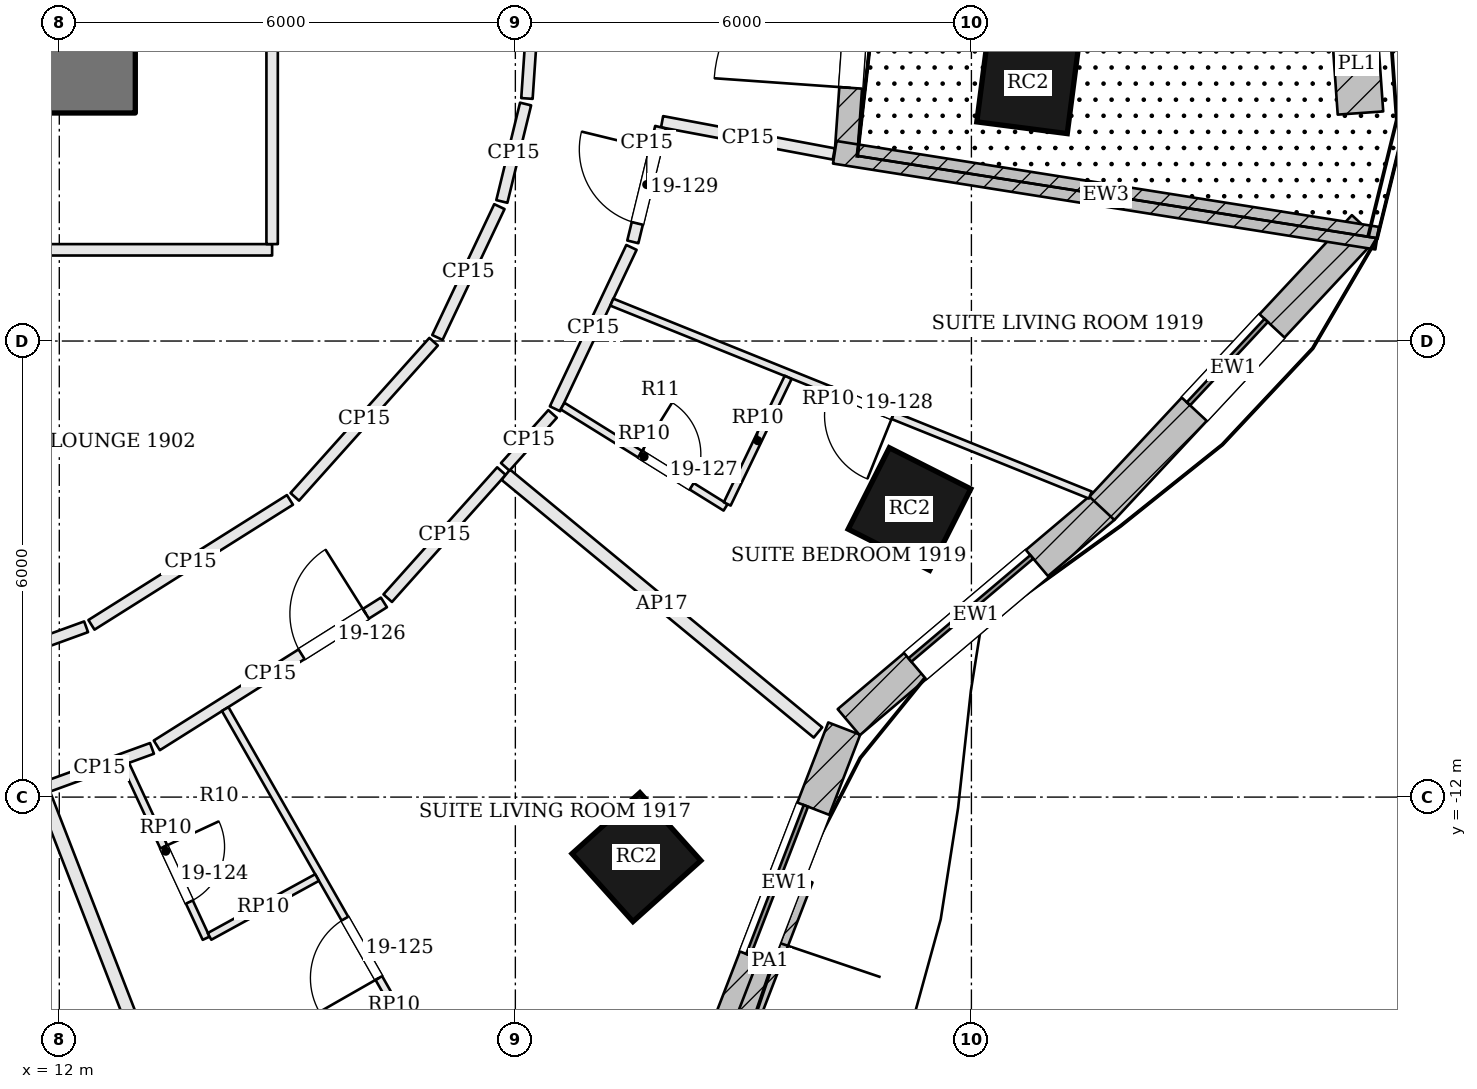
"""IFC4 building model, lengths in metres.
Left out: names, types, materials, properties, quantities, classifications, styles, units other than length and angle.
Written with IfcOpenShell. Run it as: python <this file> out.ifc"""

import sys

from ifc_helpers import new_model, si_unit, direction, frame, frame_2d, origin, origin_2d, place, context, subcontext, project, spatial, rectangle, extrude, element, fill, save


model = new_model("IFC4")
c1 = context("Model", 3, precision=1e-05, world=origin(), true_north=direction((0.0, 1.0)))
c2 = subcontext(c1, "Body", "Model", "MODEL_VIEW")
j1 = project(units=[si_unit("LENGTHUNIT", "METRE"), si_unit("PLANEANGLEUNIT", "RADIAN")], contexts=[c1])
p1 = place(None, origin())
s1 = spatial("IfcSite", under=j1, at=p1, CompositionType="ELEMENT")
p2 = place(p1, origin())
s2 = spatial("IfcBuilding", under=s1, at=p2, CompositionType="ELEMENT")
p3 = place(p2, frame((0.0, 0.0, 85.2)))
s3 = spatial("IfcBuildingStorey", under=s2, at=p3, CompositionType="ELEMENT", Elevation=85.2)
p4 = place(p3, frame((-13.0, -2.45, 0.0), z_axis=(0.0, 0.0, 1.0), x_axis=(1.0, 0.0, 0.0)))
e1 = element("IfcWall", 1, at=p4, inside=s3, PredefinedType="SHEAR", context=c2, shape_type="SweptSolid", body=[
    extrude(rectangle(XDim=26.0, YDim=1.1, at=frame_2d((13.0, 0.0))), origin(), (0.0, 0.0, 1.0), 3.6),
])
p5 = place(p4, frame((9.65, 0.0, 0.0)))
e2 = element("IfcOpeningElement", 2, at=p5, cuts=e1, PredefinedType="OPENING", context=c2, shape_type="SweptSolid", body=[
    extrude(rectangle(XDim=1.0, YDim=2.1, at=frame_2d((0.5, 1.05))), frame((0.0, 0.56, 0.0), z_axis=(0.0, -1.0, 0.0), x_axis=(1.0, 0.0, 0.0)), (0.0, 0.0, 1.0), 1.12),
])
p6 = place(p4, frame((12.925, 0.0, 0.0)))
e3 = element("IfcOpeningElement", 3, at=p6, cuts=e1, PredefinedType="OPENING", context=c2, shape_type="SweptSolid", body=[
    extrude(rectangle(XDim=1.0, YDim=2.1, at=frame_2d((0.5, 1.05))), frame((0.0, 0.56, 0.0), z_axis=(0.0, -1.0, 0.0), x_axis=(1.0, 0.0, 0.0)), (0.0, 0.0, 1.0), 1.12),
])
p7 = place(p4, frame((15.125, 0.0, 0.0)))
e4 = element("IfcOpeningElement", 4, at=p7, cuts=e1, PredefinedType="OPENING", context=c2, shape_type="SweptSolid", body=[
    extrude(rectangle(XDim=0.7, YDim=2.1, at=frame_2d((0.35, 1.05))), frame((0.0, 0.56, 0.0), z_axis=(0.0, -1.0, 0.0), x_axis=(1.0, 0.0, 0.0)), (0.0, 0.0, 1.0), 1.12),
])
p8 = place(p4, frame((16.5, 0.0, 0.0)))
e5 = element("IfcOpeningElement", 5, at=p8, cuts=e1, PredefinedType="OPENING", context=c2, shape_type="SweptSolid", body=[
    extrude(rectangle(XDim=1.0, YDim=2.1, at=frame_2d((0.5, 1.05))), frame((0.0, 0.56, 0.0), z_axis=(0.0, -1.0, 0.0), x_axis=(1.0, 0.0, 0.0)), (0.0, 0.0, 1.0), 1.12),
])
for number, where, z_axis, x_axis in (
    (6, (19.593, -12.79, 0.0), (0.0, 0.0, 1.0), (0.744, 0.668, 0.0)),
    (7, (23.185, -8.21, 0.0), (0.0, 0.0, 1.0), (0.451, 0.893, 0.0)),
    (8, (24.743, -2.599, 0.0), (0.0, 0.0, 1.0), (0.128, 0.992, 0.0)),
):
    element("IfcColumn", number, at=place(p3, frame(where, z_axis=z_axis, x_axis=x_axis)), inside=s3, PredefinedType="COLUMN", context=c2, shape_type="SweptSolid", body=[
        extrude(rectangle(XDim=1.2, YDim=1.2, at=origin_2d()), origin(), (0.0, 0.0, 1.0), 3.6),
    ])
p9 = place(p3, frame((20.757, -15.166, 0.0), z_axis=(0.0, 0.0, 1.0), x_axis=(0.360067043581, 0.932926430179, 0.0)))
e9 = element("IfcWall", 9, at=p9, inside=s3, PredefinedType="SOLIDWALL", context=c2, shape_type="SweptSolid", body=[
    extrude(rectangle(XDim=4.36, YDim=0.45, at=frame_2d((2.18, 0.0))), origin(), (0.0, 0.0, 1.0), 3.4),
])
p10 = place(p9, frame((1.13, 0.0, 0.9)))
e10 = element("IfcOpeningElement", 10, at=p10, cuts=e9, PredefinedType="OPENING", context=c2, shape_type="SweptSolid", body=[
    extrude(rectangle(XDim=2.1, YDim=2.0, at=frame_2d((1.05, 1.0))), frame((0.0, 0.235, 0.0), z_axis=(0.0, -1.0, 0.0), x_axis=(1.0, 0.0, 0.0)), (0.0, 0.0, 1.0), 0.47),
])
p11 = place(p3, frame((22.386, -11.014, 0.0), z_axis=(0.0, 0.0, 1.0), x_axis=(0.763569952162, 0.645725118108, 0.0)))
e11 = element("IfcWall", 11, at=p11, inside=s3, PredefinedType="SOLIDWALL", context=c2, shape_type="SweptSolid", body=[
    extrude(rectangle(XDim=4.386, YDim=0.45, at=frame_2d((2.193, 0.0))), origin(), (0.0, 0.0, 1.0), 3.4),
])
p12 = place(p11, frame((1.143, 0.0, 0.9)))
e12 = element("IfcOpeningElement", 12, at=p12, cuts=e11, PredefinedType="OPENING", context=c2, shape_type="SweptSolid", body=[
    extrude(rectangle(XDim=2.1, YDim=2.0, at=frame_2d((1.05, 1.0))), frame((0.0, 0.235, 0.0), z_axis=(0.0, -1.0, 0.0), x_axis=(1.0, 0.0, 0.0)), (0.0, 0.0, 1.0), 0.47),
])
p13 = place(p3, frame((25.717, -8.201, 0.0), z_axis=(0.0, 0.0, 1.0), x_axis=(0.681990073025, 0.731361429319, 0.0)))
e13 = element("IfcWall", 13, at=p13, inside=s3, PredefinedType="SOLIDWALL", context=c2, shape_type="SweptSolid", body=[
    extrude(rectangle(XDim=5.064, YDim=0.45, at=frame_2d((2.532, 0.0))), origin(), (0.0, 0.0, 1.0), 3.4),
])
p14 = place(p13, frame((1.782, 0.0, 0.9)))
e14 = element("IfcOpeningElement", 14, at=p14, cuts=e13, PredefinedType="OPENING", context=c2, shape_type="SweptSolid", body=[
    extrude(rectangle(XDim=1.5, YDim=2.0, at=frame_2d((0.75, 1.0))), frame((0.0, 0.235, 0.0), z_axis=(0.0, -1.0, 0.0), x_axis=(1.0, 0.0, 0.0)), (0.0, 0.0, 1.0), 0.47),
])
p15 = place(p3, frame((22.349, -3.553, 0.0), z_axis=(0.0, 0.0, 1.0), x_axis=(0.070246642253, 0.99752965332, 0.0)))
e15 = element("IfcWall", 15, at=p15, inside=s3, PredefinedType="SOLIDWALL", context=c2, shape_type="SweptSolid", body=[
    extrude(rectangle(XDim=3.573, YDim=0.3, at=frame_2d((1.786, 0.0))), origin(), (0.0, 0.0, 1.0), 2.904),
])
p16 = place(p15, frame((0.886, 0.0, 0.0)))
e16 = element("IfcOpeningElement", 16, at=p16, cuts=e15, PredefinedType="OPENING", context=c2, shape_type="SweptSolid", body=[
    extrude(rectangle(XDim=1.8, YDim=2.4, at=frame_2d((0.9, 1.2))), frame((0.0, 0.16, 0.0), z_axis=(0.0, -1.0, 0.0), x_axis=(1.0, 0.0, 0.0)), (0.0, 0.0, 1.0), 0.32),
])
p17 = place(p3, frame((29.338, -4.647, 0.0), z_axis=(0.0, 0.0, 1.0), x_axis=(-0.9876932675, 0.156403354615, 0.0)))
e17 = element("IfcWall", 17, at=p17, inside=s3, PredefinedType="SOLIDWALL", context=c2, shape_type="SweptSolid", body=[
    extrude(rectangle(XDim=7.224, YDim=0.3, at=frame_2d((3.612, 0.0))), origin(), (0.0, 0.0, 1.0), 2.954),
])
p18 = place(p3, frame((29.118, -3.0, 0.0), z_axis=(0.0, 0.0, 1.0), x_axis=(-0.070251176174, 0.997529334028, 0.0)))
e18 = element("IfcWall", 18, at=p18, inside=s3, PredefinedType="SOLIDWALL", context=c2, shape_type="SweptSolid", body=[
    extrude(rectangle(XDim=1.307, YDim=0.6, at=frame_2d((0.653, 0.0))), origin(), (0.0, 0.0, 1.0), 0.6),
])
p19 = place(p3, frame((20.933, -15.237, 3.6), z_axis=(0.0, 0.0, 1.0), x_axis=(0.360021038217, 0.932944184848, 0.0)))
e19 = element("IfcWall", 19, at=p19, inside=s3, PredefinedType="PARAPET", context=c2, shape_type="SweptSolid", body=[
    extrude(rectangle(XDim=2.323, YDim=0.3, at=frame_2d((1.162, 0.0))), origin(), (0.0, 0.0, 1.0), 1.1),
])
p20 = place(p3, frame((22.189, -3.539, 0.0), z_axis=(0.0, 0.0, 1.0), x_axis=(-0.982828866566, 0.184519427283, 0.0)))
e20 = element("IfcWall", 20, at=p20, inside=s3, PredefinedType="PARTITIONING", context=c2, shape_type="SweptSolid", body=[
    extrude(rectangle(XDim=2.298, YDim=0.15, at=frame_2d((1.149, 0.0))), origin(), (0.0, 0.0, 1.0), 2.784),
])
p21 = place(p3, frame((14.976, -20.153, 0.0), z_axis=(0.0, 0.0, 1.0), x_axis=(-0.361741189075, 0.932278559298, 0.0)))
e21 = element("IfcWall", 21, at=p21, inside=s3, PredefinedType="PARTITIONING", context=c2, shape_type="SweptSolid", body=[
    extrude(rectangle(XDim=8.791, YDim=0.175, at=frame_2d((4.395, 0.0))), origin(), (0.0, 0.0, 1.0), 2.784),
])
p22 = place(p3, frame((11.839, -11.862, 0.0), z_axis=(0.0, 0.0, 1.0), x_axis=(0.939613732968, 0.342236808099, 0.0)))
e22 = element("IfcWall", 22, at=p22, inside=s3, PredefinedType="PARTITIONING", context=c2, shape_type="SweptSolid", body=[
    extrude(rectangle(XDim=1.469, YDim=0.15, at=frame_2d((0.734, 0.0))), origin(), (0.0, 0.0, 1.0), 2.784),
])
p23 = place(p3, frame((13.283, -11.319, 0.0), z_axis=(0.0, 0.0, 1.0), x_axis=(0.84630789582, 0.532694044901, 0.0)))
e23 = element("IfcWall", 23, at=p23, inside=s3, PredefinedType="PARTITIONING", context=c2, shape_type="SweptSolid", body=[
    extrude(rectangle(XDim=3.53, YDim=0.15, at=frame_2d((1.765, 0.0))), origin(), (0.0, 0.0, 1.0), 2.784),
])
p24 = place(p23, frame((2.25, 0.0, 0.0)))
e24 = element("IfcOpeningElement", 24, at=p24, cuts=e23, PredefinedType="OPENING", context=c2, shape_type="SweptSolid", body=[
    extrude(rectangle(XDim=1.0, YDim=2.1, at=frame_2d((0.5, 1.05))), frame((0.0, 0.085, 0.0), z_axis=(0.0, -1.0, 0.0), x_axis=(1.0, 0.0, 0.0)), (0.0, 0.0, 1.0), 0.17),
])
p25 = place(p3, frame((16.321, -9.383, 0.0), z_axis=(0.0, 0.0, 1.0), x_axis=(0.666839397401, 0.745201461401, 0.0)))
e25 = element("IfcWall", 25, at=p25, inside=s3, PredefinedType="PARTITIONING", context=c2, shape_type="SweptSolid", body=[
    extrude(rectangle(XDim=2.243, YDim=0.15, at=frame_2d((1.122, 0.0))), origin(), (0.0, 0.0, 1.0), 2.784),
])
p26 = place(p3, frame((21.981, -11.15, 0.0), z_axis=(0.0, 0.0, 1.0), x_axis=(-0.77113299289, 0.636674098167, 0.0)))
e26 = element("IfcWall", 26, at=p26, inside=s3, PredefinedType="PARTITIONING", context=c2, shape_type="SweptSolid", body=[
    extrude(rectangle(XDim=5.325, YDim=0.175, at=frame_2d((2.663, 0.0))), origin(), (0.0, 0.0, 1.0), 2.784),
])
p27 = place(p3, frame((17.867, -7.655, 0.0), z_axis=(0.0, 0.0, 1.0), x_axis=(0.666810140689, 0.745227640574, 0.0)))
e27 = element("IfcWall", 27, at=p27, inside=s3, PredefinedType="PARTITIONING", context=c2, shape_type="SweptSolid", body=[
    extrude(rectangle(XDim=0.934, YDim=0.15, at=frame_2d((0.467, 0.0))), origin(), (0.0, 0.0, 1.0), 2.784),
])
p28 = place(p3, frame((18.522, -6.891, 0.0), z_axis=(0.0, 0.0, 1.0), x_axis=(0.428157819028, 0.903703979191, 0.0)))
e28 = element("IfcWall", 28, at=p28, inside=s3, PredefinedType="PARTITIONING", context=c2, shape_type="SweptSolid", body=[
    extrude(rectangle(XDim=2.349, YDim=0.15, at=frame_2d((1.175, 0.0))), origin(), (0.0, 0.0, 1.0), 2.784),
])
p29 = place(p3, frame((19.545, -4.696, 0.0), z_axis=(0.0, 0.0, 1.0), x_axis=(0.236608489862, 0.971605075391, 0.0)))
e29 = element("IfcWall", 29, at=p29, inside=s3, PredefinedType="PARTITIONING", context=c2, shape_type="SweptSolid", body=[
    extrude(rectangle(XDim=1.552, YDim=0.15, at=frame_2d((0.776, 0.0))), origin(), (0.0, 0.0, 1.0), 2.784),
])
p30 = place(p29, frame((0.25, 0.0, 0.0)))
e30 = element("IfcOpeningElement", 30, at=p30, cuts=e29, PredefinedType="OPENING", context=c2, shape_type="SweptSolid", body=[
    extrude(rectangle(XDim=1.0, YDim=2.1, at=frame_2d((0.5, 1.05))), frame((0.0, 0.085, 0.0), z_axis=(0.0, -1.0, 0.0), x_axis=(1.0, 0.0, 0.0)), (0.0, 0.0, 1.0), 0.17),
])
p31 = place(p3, frame((18.34, -0.075, 0.0), z_axis=(0.0, 0.0, 1.0), x_axis=(-0.068328193832, -0.997662897941, 0.0)))
e31 = element("IfcWall", 31, at=p31, inside=s3, PredefinedType="PARTITIONING", context=c2, shape_type="SweptSolid", body=[
    extrude(rectangle(XDim=2.74, YDim=0.15, at=frame_2d((1.37, 0.0))), origin(), (0.0, 0.0, 1.0), 2.784),
])
p32 = place(p3, frame((18.135, -2.882, 0.0), z_axis=(0.0, 0.0, 1.0), x_axis=(-0.236653741324, -0.971594054489, 0.0)))
e32 = element("IfcWall", 32, at=p32, inside=s3, PredefinedType="PARTITIONING", context=c2, shape_type="SweptSolid", body=[
    extrude(rectangle(XDim=1.32, YDim=0.15, at=frame_2d((0.66, 0.0))), origin(), (0.0, 0.0, 1.0), 2.784),
])
p33 = place(p3, frame((17.79, -4.231, 0.0), z_axis=(0.0, 0.0, 1.0), x_axis=(-0.428042272357, -0.90375871397, 0.0)))
e33 = element("IfcWall", 33, at=p33, inside=s3, PredefinedType="PARTITIONING", context=c2, shape_type="SweptSolid", body=[
    extrude(rectangle(XDim=1.905, YDim=0.15, at=frame_2d((0.953, 0.0))), origin(), (0.0, 0.0, 1.0), 2.784),
])
p34 = place(p3, frame((16.925, -6.009, 0.0), z_axis=(0.0, 0.0, 1.0), x_axis=(-0.666893859891, -0.745152722359, 0.0)))
e34 = element("IfcWall", 34, at=p34, inside=s3, PredefinedType="PARTITIONING", context=c2, shape_type="SweptSolid", body=[
    extrude(rectangle(XDim=2.739, YDim=0.15, at=frame_2d((1.37, 0.0))), origin(), (0.0, 0.0, 1.0), 2.784),
])
p35 = place(p3, frame((15.034, -8.09, 0.0), z_axis=(0.0, 0.0, 1.0), x_axis=(-0.846322679414, -0.532670557014, 0.0)))
e35 = element("IfcWall", 35, at=p35, inside=s3, PredefinedType="PARTITIONING", context=c2, shape_type="SweptSolid", body=[
    extrude(rectangle(XDim=3.085, YDim=0.15, at=frame_2d((1.543, 0.0))), origin(), (0.0, 0.0, 1.0), 2.784),
])
p36 = place(p3, frame((12.353, -9.76, 0.0), z_axis=(0.0, 0.0, 1.0), x_axis=(-0.939632450309, -0.342185415127, 0.0)))
e36 = element("IfcWall", 36, at=p36, inside=s3, PredefinedType="PARTITIONING", context=c2, shape_type="SweptSolid", body=[
    extrude(rectangle(XDim=3.368, YDim=0.15, at=frame_2d((1.684, 0.0))), origin(), (0.0, 0.0, 1.0), 2.784),
])
p37 = place(p3, frame((-14.725, -4.8, 0.0), z_axis=(0.0, 0.0, 1.0), x_axis=(1.0, 0.0, 0.0)))
e37 = element("IfcWall", 37, at=p37, inside=s3, PredefinedType="PARTITIONING", context=c2, shape_type="SweptSolid", body=[
    extrude(rectangle(XDim=29.525, YDim=0.15, at=frame_2d((14.763, 0.0))), origin(), (0.0, 0.0, 1.0), 2.784),
])
p38 = place(p37, frame((13.825, 0.0, 0.0)))
e38 = element("IfcOpeningElement", 38, at=p38, cuts=e37, PredefinedType="OPENING", context=c2, shape_type="SweptSolid", body=[
    extrude(rectangle(XDim=1.8, YDim=2.1, at=frame_2d((0.9, 1.05))), frame((0.0, 0.085, 0.0), z_axis=(0.0, -1.0, 0.0), x_axis=(1.0, 0.0, 0.0)), (0.0, 0.0, 1.0), 0.17),
])
p39 = place(p3, frame((14.8, -4.725, 0.0), z_axis=(0.0, 0.0, 1.0), x_axis=(0.0, 1.0, 0.0)))
e39 = element("IfcWall", 39, at=p39, inside=s3, PredefinedType="PARTITIONING", context=c2, shape_type="SweptSolid", body=[
    extrude(rectangle(XDim=12.948, YDim=0.15, at=frame_2d((6.474, 0.0))), origin(), (0.0, 0.0, 1.0), 2.784),
])
p40 = place(p39, frame((5.536, 0.0, 0.0)))
e40 = element("IfcOpeningElement", 40, at=p40, cuts=e39, PredefinedType="OPENING", context=c2, shape_type="SweptSolid", body=[
    extrude(rectangle(XDim=1.8, YDim=2.1, at=frame_2d((0.9, 1.05))), frame((0.0, 0.085, 0.0), z_axis=(0.0, -1.0, 0.0), x_axis=(1.0, 0.0, 0.0)), (0.0, 0.0, 1.0), 0.17),
])
p41 = place(p3, frame((18.622, -18.615, 0.0), z_axis=(0.0, 0.0, 1.0), x_axis=(-0.495924530613, 0.868365625723, 0.0)))
e41 = element("IfcWall", 41, at=p41, inside=s3, PredefinedType="PARTITIONING", context=c2, shape_type="SweptSolid", body=[
    extrude(rectangle(XDim=8.952, YDim=0.1, at=frame_2d((4.476, 0.0))), origin(), (0.0, 0.0, 1.0), 2.784),
])
p42 = place(p41, frame((4.877, 0.0, 0.0)))
e42 = element("IfcOpeningElement", 42, at=p42, cuts=e41, PredefinedType="OPENING", context=c2, shape_type="SweptSolid", body=[
    extrude(rectangle(XDim=0.9, YDim=2.4, at=frame_2d((0.45, 1.2))), frame((0.0, 0.06, 0.0), z_axis=(0.0, -1.0, 0.0), x_axis=(1.0, 0.0, 0.0)), (0.0, 0.0, 1.0), 0.12),
])
p43 = place(p3, frame((12.87, -11.566, 0.0), z_axis=(0.0, 0.0, 1.0), x_axis=(0.42076187936, -0.907171119953, 0.0)))
e43 = element("IfcWall", 43, at=p43, inside=s3, PredefinedType="PARTITIONING", context=c2, shape_type="SweptSolid", body=[
    extrude(rectangle(XDim=2.525, YDim=0.1, at=frame_2d((1.263, 0.0))), origin(), (0.0, 0.0, 1.0), 2.784),
])
p44 = place(p43, frame((1.2, 0.0, 0.0)))
e44 = element("IfcOpeningElement", 44, at=p44, cuts=e43, PredefinedType="OPENING", context=c2, shape_type="SweptSolid", body=[
    extrude(rectangle(XDim=0.8, YDim=2.1, at=frame_2d((0.4, 1.05))), frame((0.0, 0.06, 0.0), z_axis=(0.0, -1.0, 0.0), x_axis=(1.0, 0.0, 0.0)), (0.0, 0.0, 1.0), 0.12),
])
p45 = place(p3, frame((13.976, -13.833, 0.0), z_axis=(0.0, 0.0, 1.0), x_axis=(0.877160016476, 0.480198193975, 0.0)))
e45 = element("IfcWall", 45, at=p45, inside=s3, PredefinedType="PARTITIONING", context=c2, shape_type="SweptSolid", body=[
    extrude(rectangle(XDim=1.613, YDim=0.1, at=frame_2d((0.807, 0.0))), origin(), (0.0, 0.0, 1.0), 2.784),
])
p46 = place(p3, frame((25.564, -8.027, 0.0), z_axis=(0.0, 0.0, 1.0), x_axis=(-0.927456159862, 0.373931907618, 0.0)))
e46 = element("IfcWall", 46, at=p46, inside=s3, PredefinedType="PARTITIONING", context=c2, shape_type="SweptSolid", body=[
    extrude(rectangle(XDim=6.788, YDim=0.1, at=frame_2d((3.394, 0.0))), origin(), (0.0, 0.0, 1.0), 2.784),
])
p47 = place(p46, frame((2.8, 0.0, 0.0)))
e47 = element("IfcOpeningElement", 47, at=p47, cuts=e46, PredefinedType="OPENING", context=c2, shape_type="SweptSolid", body=[
    extrude(rectangle(XDim=0.9, YDim=2.4, at=frame_2d((0.45, 1.2))), frame((0.0, 0.06, 0.0), z_axis=(0.0, -1.0, 0.0), x_axis=(1.0, 0.0, 0.0)), (0.0, 0.0, 1.0), 0.12),
])
p48 = place(p3, frame((18.621, -6.856, 0.0), z_axis=(0.0, 0.0, 1.0), x_axis=(0.849413013487, -0.527728654253, 0.0)))
e48 = element("IfcWall", 48, at=p48, inside=s3, PredefinedType="PARTITIONING", context=c2, shape_type="SweptSolid", body=[
    extrude(rectangle(XDim=2.525, YDim=0.1, at=frame_2d((1.262, 0.0))), origin(), (0.0, 0.0, 1.0), 2.784),
])
p49 = place(p48, frame((1.2, 0.0, 0.0)))
e49 = element("IfcOpeningElement", 49, at=p49, cuts=e48, PredefinedType="OPENING", context=c2, shape_type="SweptSolid", body=[
    extrude(rectangle(XDim=0.8, YDim=2.1, at=frame_2d((0.4, 1.05))), frame((0.0, 0.06, 0.0), z_axis=(0.0, -1.0, 0.0), x_axis=(1.0, 0.0, 0.0)), (0.0, 0.0, 1.0), 0.12),
])
p50 = place(p3, frame((20.788, -8.143, 0.0), z_axis=(0.0, 0.0, 1.0), x_axis=(0.433744136444, 0.901036083684, 0.0)))
e50 = element("IfcWall", 50, at=p50, inside=s3, PredefinedType="PARTITIONING", context=c2, shape_type="SweptSolid", body=[
    extrude(rectangle(XDim=1.848, YDim=0.1, at=frame_2d((0.924, 0.0))), origin(), (0.0, 0.0, 1.0), 2.784),
])
p51 = place(p10, origin())
e51 = element("IfcWindow", 51, at=p51, inside=s3, PartitioningType="SINGLE_PANEL", PredefinedType="WINDOW", context=c2, shape_type="SweptSolid", body=[
    extrude(rectangle(XDim=2.1, YDim=2.0, at=frame_2d((1.05, 1.0))), frame((0.0, 0.135, 0.0), z_axis=(0.0, -1.0, 0.0), x_axis=(1.0, 0.0, 0.0)), (0.0, 0.0, 1.0), 0.06),
])
fill(e10, e51)
p52 = place(p12, origin())
e52 = element("IfcWindow", 52, at=p52, inside=s3, PartitioningType="SINGLE_PANEL", PredefinedType="WINDOW", context=c2, shape_type="SweptSolid", body=[
    extrude(rectangle(XDim=2.1, YDim=2.0, at=frame_2d((1.05, 1.0))), frame((0.0, 0.135, 0.0), z_axis=(0.0, -1.0, 0.0), x_axis=(1.0, 0.0, 0.0)), (0.0, 0.0, 1.0), 0.06),
])
fill(e12, e52)
p53 = place(p14, origin())
e53 = element("IfcWindow", 53, at=p53, inside=s3, PartitioningType="SINGLE_PANEL", PredefinedType="WINDOW", context=c2, shape_type="SweptSolid", body=[
    extrude(rectangle(XDim=1.5, YDim=2.0, at=frame_2d((0.75, 1.0))), frame((0.0, 0.135, 0.0), z_axis=(0.0, -1.0, 0.0), x_axis=(1.0, 0.0, 0.0)), (0.0, 0.0, 1.0), 0.06),
])
fill(e14, e53)
p54 = place(p16, origin())
e54 = element("IfcDoor", 54, at=p54, inside=s3, OperationType="DOUBLE_DOOR_DOUBLE_SWING", PredefinedType="DOOR", context=c2, shape_type="SweptSolid", body=[
    extrude(rectangle(XDim=1.8, YDim=2.4, at=frame_2d((0.9, 1.2))), frame((0.0, 0.025, 0.0), z_axis=(0.0, -1.0, 0.0), x_axis=(1.0, 0.0, 0.0)), (0.0, 0.0, 1.0), 0.05),
])
fill(e16, e54)
p55 = place(p44, origin())
e55 = element("IfcDoor", 55, at=p55, inside=s3, OperationType="SINGLE_SWING_LEFT", PredefinedType="DOOR", context=c2, shape_type="SweptSolid", body=[
    extrude(rectangle(XDim=0.8, YDim=2.1, at=frame_2d((0.4, 1.05))), frame((0.0, 0.025, 0.0), z_axis=(0.0, -1.0, 0.0), x_axis=(1.0, 0.0, 0.0)), (0.0, 0.0, 1.0), 0.05),
])
fill(e44, e55)
p56 = place(p42, origin())
e56 = element("IfcDoor", 56, at=p56, inside=s3, OperationType="SINGLE_SWING_LEFT", PredefinedType="DOOR", context=c2, shape_type="SweptSolid", body=[
    extrude(rectangle(XDim=0.9, YDim=2.4, at=frame_2d((0.45, 1.2))), frame((0.0, 0.025, 0.0), z_axis=(0.0, -1.0, 0.0), x_axis=(1.0, 0.0, 0.0)), (0.0, 0.0, 1.0), 0.05),
])
fill(e42, e56)
p57 = place(p24, origin())
e57 = element("IfcDoor", 57, at=p57, inside=s3, OperationType="SINGLE_SWING_RIGHT", PredefinedType="DOOR", context=c2, shape_type="SweptSolid", body=[
    extrude(rectangle(XDim=1.0, YDim=2.1, at=frame_2d((0.5, 1.05))), frame((0.0, 0.025, 0.0), z_axis=(0.0, -1.0, 0.0), x_axis=(1.0, 0.0, 0.0)), (0.0, 0.0, 1.0), 0.05),
])
fill(e24, e57)
p58 = place(p49, origin())
e58 = element("IfcDoor", 58, at=p58, inside=s3, OperationType="SINGLE_SWING_LEFT", PredefinedType="DOOR", context=c2, shape_type="SweptSolid", body=[
    extrude(rectangle(XDim=0.8, YDim=2.1, at=frame_2d((0.4, 1.05))), frame((0.0, 0.025, 0.0), z_axis=(0.0, -1.0, 0.0), x_axis=(1.0, 0.0, 0.0)), (0.0, 0.0, 1.0), 0.05),
])
fill(e49, e58)
p59 = place(p47, origin())
e59 = element("IfcDoor", 59, at=p59, inside=s3, OperationType="SINGLE_SWING_LEFT", PredefinedType="DOOR", context=c2, shape_type="SweptSolid", body=[
    extrude(rectangle(XDim=0.9, YDim=2.4, at=frame_2d((0.45, 1.2))), frame((0.0, 0.025, 0.0), z_axis=(0.0, -1.0, 0.0), x_axis=(1.0, 0.0, 0.0)), (0.0, 0.0, 1.0), 0.05),
])
fill(e47, e59)
p60 = place(p30, origin())
e60 = element("IfcDoor", 60, at=p60, inside=s3, OperationType="SINGLE_SWING_RIGHT", PredefinedType="DOOR", context=c2, shape_type="SweptSolid", body=[
    extrude(rectangle(XDim=1.0, YDim=2.1, at=frame_2d((0.5, 1.05))), frame((0.0, 0.025, 0.0), z_axis=(0.0, -1.0, 0.0), x_axis=(1.0, 0.0, 0.0)), (0.0, 0.0, 1.0), 0.05),
])
fill(e30, e60)
save(model, sys.argv[1])
